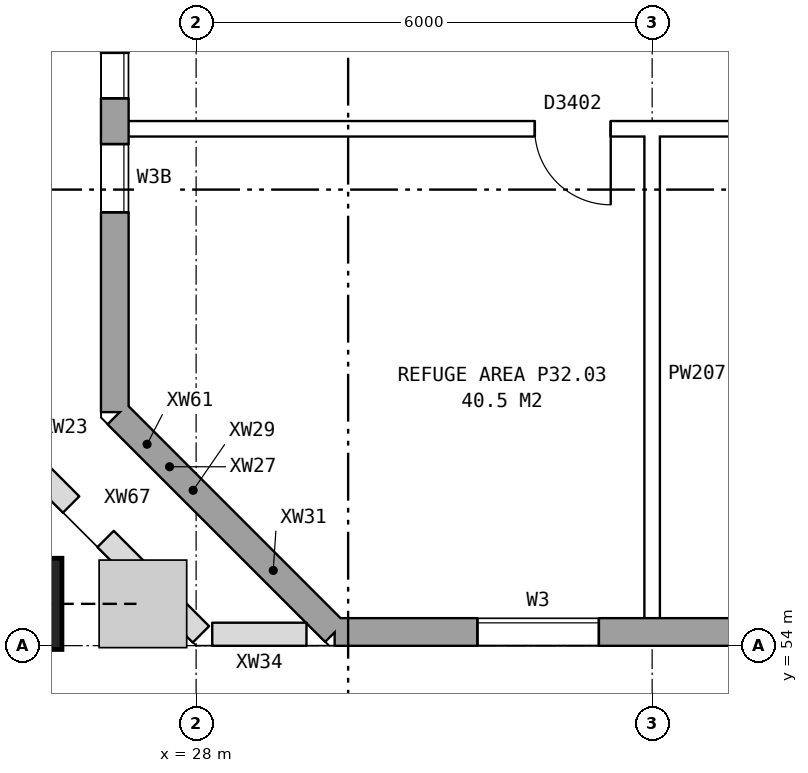
"""IFC4 building model, lengths in metres.
Left out: names, types, materials, properties, quantities, classifications, styles, units other than length and angle.
Written with IfcOpenShell. Run it as: python <this file> out.ifc"""

import sys

from ifc_helpers import new_model, si_unit, direction, frame, frame_2d, origin, origin_2d, place, context, subcontext, project, spatial, rectangle, hollow_rectangle, extrude, element, fill, save


model = new_model("IFC4")
c1 = context("Model", 3, precision=1e-05, world=origin(), true_north=direction((0.0, 1.0)))
c2 = subcontext(c1, "Body", "Model", "MODEL_VIEW")
j1 = project(units=[si_unit("LENGTHUNIT", "METRE"), si_unit("PLANEANGLEUNIT", "RADIAN")], contexts=[c1])
p1 = place(None, origin())
s1 = spatial("IfcSite", under=j1, at=p1, CompositionType="ELEMENT")
p2 = place(p1, origin())
s2 = spatial("IfcBuilding", under=s1, at=p2, CompositionType="ELEMENT")
p3 = place(p2, frame((0.0, 0.0, 115.0)))
s3 = spatial("IfcBuildingStorey", under=s2, at=p3, CompositionType="ELEMENT", Elevation=115.0)
p4 = place(p3, frame((25.635, 54.55, 0.218), z_axis=(0.362446261155, 0.0, 0.932004671541), x_axis=(0.0, 1.0, 0.0)))
e1 = element("IfcColumn", 1, at=p4, inside=s3, PredefinedType="COLUMN", context=c2, shape_type="SweptSolid", body=[
    extrude(hollow_rectangle(XDim=1.2, YDim=1.2, WallThickness=0.065, at=origin_2d()), origin(), (0.0, 0.0, 1.0), 4.362),
])
p5 = place(p3, frame((26.965, 57.039, 0.0), z_axis=(0.0, 0.0, 1.0), x_axis=(0.707106781187, -0.707106781187, 0.0)))
e2 = element("IfcWall", 2, at=p5, inside=s3, PredefinedType="STANDARD", context=c2, shape_type="SweptSolid", body=[
    extrude(rectangle(XDim=0.224, YDim=0.36, at=frame_2d((0.112, 0.0))), origin(), (0.0, 0.0, 1.0), 4.2),
])
p6 = place(p3, frame((27.124, 56.881, 0.953), z_axis=(0.0, 0.0, 1.0), x_axis=(0.707106781187, -0.707106781187, 0.0)))
e3 = element("IfcWall", 3, at=p6, inside=s3, PredefinedType="STANDARD", context=c2, shape_type="SweptSolid", body=[
    extrude(rectangle(XDim=0.652, YDim=0.36, at=frame_2d((0.326, 0.0))), origin(), (0.0, 0.0, 1.0), 3.247),
])
p7 = place(p3, frame((27.585, 56.419, 0.0), z_axis=(0.0, 0.0, 1.0), x_axis=(0.707106781187, -0.707106781187, 0.0)))
e4 = element("IfcWall", 4, at=p7, inside=s3, PredefinedType="STANDARD", context=c2, shape_type="SweptSolid", body=[
    extrude(rectangle(XDim=0.186, YDim=0.36, at=frame_2d((0.093, 0.0))), origin(), (0.0, 0.0, 1.0), 4.2),
])
p8 = place(p3, frame((27.717, 56.288, 0.0), z_axis=(0.0, 0.0, 1.0), x_axis=(0.707106781187, -0.707106781187, 0.0)))
e5 = element("IfcWall", 5, at=p8, inside=s3, PredefinedType="STANDARD", context=c2, shape_type="SweptSolid", body=[
    extrude(rectangle(XDim=0.69, YDim=0.36, at=frame_2d((0.345, 0.0))), origin(), (0.0, 0.0, 1.0), 3.397),
])
p9 = place(p3, frame((28.205, 55.8, 0.0), z_axis=(0.0, 0.0, 1.0), x_axis=(0.707106781187, -0.707106781187, 0.0)))
e6 = element("IfcWall", 6, at=p9, inside=s3, PredefinedType="STANDARD", context=c2, shape_type="SweptSolid", body=[
    extrude(rectangle(XDim=2.291, YDim=0.36, at=frame_2d((1.146, 0.0))), origin(), (0.0, 0.0, 1.0), 4.2),
])
p10 = place(p3, frame((29.825, 54.18, 0.0), z_axis=(0.0, 0.0, 1.0), x_axis=(1.0, 0.0, 0.0)))
e7 = element("IfcWall", 7, at=p10, inside=s3, PredefinedType="STANDARD", context=c2, shape_type="SweptSolid", body=[
    extrude(rectangle(XDim=43.101, YDim=0.36, at=frame_2d((21.55, 0.0))), origin(), (0.0, 0.0, 1.0), 4.2),
])
p11 = place(p10, frame((1.875, 0.0, 1.5)))
e8 = element("IfcOpeningElement", 8, at=p11, cuts=e7, PredefinedType="OPENING", context=c2, shape_type="SweptSolid", body=[
    extrude(rectangle(XDim=1.6, YDim=1.2, at=frame_2d((0.8, 0.6))), frame((0.0, 0.19, 0.0), z_axis=(0.0, -1.0, 0.0), x_axis=(1.0, 0.0, 0.0)), (0.0, 0.0, 1.0), 0.38),
])
p12 = place(p10, frame((5.825, 0.0, 1.5)))
e9 = element("IfcOpeningElement", 9, at=p12, cuts=e7, PredefinedType="OPENING", context=c2, shape_type="SweptSolid", body=[
    extrude(rectangle(XDim=1.6, YDim=1.2, at=frame_2d((0.8, 0.6))), frame((0.0, 0.19, 0.0), z_axis=(0.0, -1.0, 0.0), x_axis=(1.0, 0.0, 0.0)), (0.0, 0.0, 1.0), 0.38),
])
p13 = place(p10, frame((7.875, 0.0, 1.5)))
e10 = element("IfcOpeningElement", 10, at=p13, cuts=e7, PredefinedType="OPENING", context=c2, shape_type="SweptSolid", body=[
    extrude(rectangle(XDim=1.6, YDim=1.2, at=frame_2d((0.8, 0.6))), frame((0.0, 0.19, 0.0), z_axis=(0.0, -1.0, 0.0), x_axis=(1.0, 0.0, 0.0)), (0.0, 0.0, 1.0), 0.38),
])
p14 = place(p10, frame((13.875, 0.0, 1.5)))
e11 = element("IfcOpeningElement", 11, at=p14, cuts=e7, PredefinedType="OPENING", context=c2, shape_type="SweptSolid", body=[
    extrude(rectangle(XDim=1.6, YDim=1.2, at=frame_2d((0.8, 0.6))), frame((0.0, 0.19, 0.0), z_axis=(0.0, -1.0, 0.0), x_axis=(1.0, 0.0, 0.0)), (0.0, 0.0, 1.0), 0.38),
])
p15 = place(p10, frame((18.325, 0.0, 1.5)))
e12 = element("IfcOpeningElement", 12, at=p15, cuts=e7, PredefinedType="OPENING", context=c2, shape_type="SweptSolid", body=[
    extrude(rectangle(XDim=1.2, YDim=1.2, at=frame_2d((0.6, 0.6))), frame((0.0, 0.19, 0.0), z_axis=(0.0, -1.0, 0.0), x_axis=(1.0, 0.0, 0.0)), (0.0, 0.0, 1.0), 0.38),
])
p16 = place(p10, frame((19.875, 0.0, 1.5)))
e13 = element("IfcOpeningElement", 13, at=p16, cuts=e7, PredefinedType="OPENING", context=c2, shape_type="SweptSolid", body=[
    extrude(rectangle(XDim=1.6, YDim=1.2, at=frame_2d((0.8, 0.6))), frame((0.0, 0.19, 0.0), z_axis=(0.0, -1.0, 0.0), x_axis=(1.0, 0.0, 0.0)), (0.0, 0.0, 1.0), 0.38),
])
p17 = place(p10, frame((22.375, 0.0, 1.5)))
e14 = element("IfcOpeningElement", 14, at=p17, cuts=e7, PredefinedType="OPENING", context=c2, shape_type="SweptSolid", body=[
    extrude(rectangle(XDim=0.6, YDim=1.2, at=frame_2d((0.3, 0.6))), frame((0.0, 0.19, 0.0), z_axis=(0.0, -1.0, 0.0), x_axis=(1.0, 0.0, 0.0)), (0.0, 0.0, 1.0), 0.38),
])
p18 = place(p10, frame((25.875, 0.0, 1.5)))
e15 = element("IfcOpeningElement", 15, at=p18, cuts=e7, PredefinedType="OPENING", context=c2, shape_type="SweptSolid", body=[
    extrude(rectangle(XDim=1.6, YDim=1.2, at=frame_2d((0.8, 0.6))), frame((0.0, 0.19, 0.0), z_axis=(0.0, -1.0, 0.0), x_axis=(1.0, 0.0, 0.0)), (0.0, 0.0, 1.0), 0.38),
])
p19 = place(p10, frame((30.775, 0.0, 1.5)))
e16 = element("IfcOpeningElement", 16, at=p19, cuts=e7, PredefinedType="OPENING", context=c2, shape_type="SweptSolid", body=[
    extrude(rectangle(XDim=0.6, YDim=1.2, at=frame_2d((0.3, 0.6))), frame((0.0, 0.19, 0.0), z_axis=(0.0, -1.0, 0.0), x_axis=(1.0, 0.0, 0.0)), (0.0, 0.0, 1.0), 0.38),
])
p20 = place(p10, frame((31.875, 0.0, 1.5)))
e17 = element("IfcOpeningElement", 17, at=p20, cuts=e7, PredefinedType="OPENING", context=c2, shape_type="SweptSolid", body=[
    extrude(rectangle(XDim=1.6, YDim=1.2, at=frame_2d((0.8, 0.6))), frame((0.0, 0.19, 0.0), z_axis=(0.0, -1.0, 0.0), x_axis=(1.0, 0.0, 0.0)), (0.0, 0.0, 1.0), 0.38),
])
p21 = place(p10, frame((34.375, 0.0, 1.5)))
e18 = element("IfcOpeningElement", 18, at=p21, cuts=e7, PredefinedType="OPENING", context=c2, shape_type="SweptSolid", body=[
    extrude(rectangle(XDim=0.9, YDim=1.2, at=frame_2d((0.45, 0.6))), frame((0.0, 0.19, 0.0), z_axis=(0.0, -1.0, 0.0), x_axis=(1.0, 0.0, 0.0)), (0.0, 0.0, 1.0), 0.38),
])
p22 = place(p10, frame((37.875, 0.0, 1.5)))
e19 = element("IfcOpeningElement", 19, at=p22, cuts=e7, PredefinedType="OPENING", context=c2, shape_type="SweptSolid", body=[
    extrude(rectangle(XDim=1.6, YDim=1.2, at=frame_2d((0.8, 0.6))), frame((0.0, 0.19, 0.0), z_axis=(0.0, -1.0, 0.0), x_axis=(1.0, 0.0, 0.0)), (0.0, 0.0, 1.0), 0.38),
])
p23 = place(p10, frame((39.775, 0.0, 1.5)))
e20 = element("IfcOpeningElement", 20, at=p23, cuts=e7, PredefinedType="OPENING", context=c2, shape_type="SweptSolid", body=[
    extrude(rectangle(XDim=0.6, YDim=1.2, at=frame_2d((0.3, 0.6))), frame((0.0, 0.19, 0.0), z_axis=(0.0, -1.0, 0.0), x_axis=(1.0, 0.0, 0.0)), (0.0, 0.0, 1.0), 0.38),
])
p24 = place(p3, frame((26.93, 82.925, 0.0), z_axis=(0.0, 0.0, 1.0), x_axis=(0.0, -1.0, 0.0)))
e21 = element("IfcWall", 21, at=p24, inside=s3, PredefinedType="STANDARD", context=c2, shape_type="SweptSolid", body=[
    extrude(rectangle(XDim=25.851, YDim=0.36, at=frame_2d((12.925, 0.0))), origin(), (0.0, 0.0, 1.0), 4.2),
])
p25 = place(p24, frame((1.625, 0.0, 1.5)))
e22 = element("IfcOpeningElement", 22, at=p25, cuts=e21, PredefinedType="OPENING", context=c2, shape_type="SweptSolid", body=[
    extrude(rectangle(XDim=1.6, YDim=1.2, at=frame_2d((0.8, 0.6))), frame((0.0, 0.19, 0.0), z_axis=(0.0, -1.0, 0.0), x_axis=(1.0, 0.0, 0.0)), (0.0, 0.0, 1.0), 0.38),
])
p26 = place(p24, frame((4.625, 0.0, 1.5)))
e23 = element("IfcOpeningElement", 23, at=p26, cuts=e21, PredefinedType="OPENING", context=c2, shape_type="SweptSolid", body=[
    extrude(rectangle(XDim=1.6, YDim=1.2, at=frame_2d((0.8, 0.6))), frame((0.0, 0.19, 0.0), z_axis=(0.0, -1.0, 0.0), x_axis=(1.0, 0.0, 0.0)), (0.0, 0.0, 1.0), 0.38),
])
p27 = place(p24, frame((8.775, 0.0, 1.5)))
e24 = element("IfcOpeningElement", 24, at=p27, cuts=e21, PredefinedType="OPENING", context=c2, shape_type="SweptSolid", body=[
    extrude(rectangle(XDim=0.6, YDim=1.2, at=frame_2d((0.3, 0.6))), frame((0.0, 0.19, 0.0), z_axis=(0.0, -1.0, 0.0), x_axis=(1.0, 0.0, 0.0)), (0.0, 0.0, 1.0), 0.38),
])
p28 = place(p24, frame((9.675, 0.0, 1.5)))
e25 = element("IfcOpeningElement", 25, at=p28, cuts=e21, PredefinedType="OPENING", context=c2, shape_type="SweptSolid", body=[
    extrude(rectangle(XDim=1.2, YDim=1.2, at=frame_2d((0.6, 0.6))), frame((0.0, 0.19, 0.0), z_axis=(0.0, -1.0, 0.0), x_axis=(1.0, 0.0, 0.0)), (0.0, 0.0, 1.0), 0.38),
])
p29 = place(p24, frame((13.625, 0.0, 1.5)))
e26 = element("IfcOpeningElement", 26, at=p29, cuts=e21, PredefinedType="OPENING", context=c2, shape_type="SweptSolid", body=[
    extrude(rectangle(XDim=1.6, YDim=1.2, at=frame_2d((0.8, 0.6))), frame((0.0, 0.19, 0.0), z_axis=(0.0, -1.0, 0.0), x_axis=(1.0, 0.0, 0.0)), (0.0, 0.0, 1.0), 0.38),
])
p30 = place(p24, frame((16.625, 0.0, 1.5)))
e27 = element("IfcOpeningElement", 27, at=p30, cuts=e21, PredefinedType="OPENING", context=c2, shape_type="SweptSolid", body=[
    extrude(rectangle(XDim=1.6, YDim=1.2, at=frame_2d((0.8, 0.6))), frame((0.0, 0.19, 0.0), z_axis=(0.0, -1.0, 0.0), x_axis=(1.0, 0.0, 0.0)), (0.0, 0.0, 1.0), 0.38),
])
p31 = place(p24, frame((21.125, 0.0, 1.5)))
e28 = element("IfcOpeningElement", 28, at=p31, cuts=e21, PredefinedType="OPENING", context=c2, shape_type="SweptSolid", body=[
    extrude(rectangle(XDim=0.6, YDim=1.2, at=frame_2d((0.3, 0.6))), frame((0.0, 0.19, 0.0), z_axis=(0.0, -1.0, 0.0), x_axis=(1.0, 0.0, 0.0)), (0.0, 0.0, 1.0), 0.38),
])
p32 = place(p24, frame((22.325, 0.0, 1.5)))
e29 = element("IfcOpeningElement", 29, at=p32, cuts=e21, PredefinedType="OPENING", context=c2, shape_type="SweptSolid", body=[
    extrude(rectangle(XDim=0.9, YDim=1.2, at=frame_2d((0.45, 0.6))), frame((0.0, 0.19, 0.0), z_axis=(0.0, -1.0, 0.0), x_axis=(1.0, 0.0, 0.0)), (0.0, 0.0, 1.0), 0.38),
])
p33 = place(p24, frame((15.525, 0.0, 1.5)))
e30 = element("IfcOpeningElement", 30, at=p33, cuts=e21, PredefinedType="OPENING", context=c2, shape_type="SweptSolid", body=[
    extrude(rectangle(XDim=0.6, YDim=1.2, at=frame_2d((0.3, 0.6))), frame((0.0, 0.19, 0.0), z_axis=(0.0, -1.0, 0.0), x_axis=(1.0, 0.0, 0.0)), (0.0, 0.0, 1.0), 0.38),
])
p34 = place(p3, frame((25.398, 56.814, 0.0), z_axis=(0.0, 0.0, 1.0), x_axis=(0.707106781187, -0.707106781187, 0.0)))
e31 = element("IfcWall", 31, at=p34, inside=s3, PredefinedType="PARAPET", context=c2, shape_type="SweptSolid", body=[
    extrude(rectangle(XDim=1.352, YDim=0.3, at=frame_2d((0.676, 0.0))), origin(), (0.0, 0.0, 1.0), 1.1),
])
p35 = place(p3, frame((26.81, 55.402, 0.0), z_axis=(0.0, 0.0, 1.0), x_axis=(0.707037825433, -0.707175730216, 0.0)))
e32 = element("IfcWall", 32, at=p35, inside=s3, PredefinedType="PARAPET", context=c2, shape_type="SweptSolid", body=[
    extrude(rectangle(XDim=1.77, YDim=0.3, at=frame_2d((0.885, 0.0))), origin(), (0.0, 0.0, 1.0), 1.1),
])
p36 = place(p3, frame((28.214, 54.15, 0.0), z_axis=(0.0, 0.0, 1.0), x_axis=(1.0, 0.0, 0.0)))
e33 = element("IfcWall", 33, at=p36, inside=s3, PredefinedType="PARAPET", context=c2, shape_type="SweptSolid", body=[
    extrude(rectangle(XDim=1.236, YDim=0.3, at=frame_2d((0.618, 0.0))), origin(), (0.0, 0.0, 1.0), 1.1),
])
p37 = place(p3, frame((26.99, 60.8, 0.0), z_axis=(0.0, 0.0, 1.0), x_axis=(1.0, 0.0, 0.0)))
e34 = element("IfcWall", 34, at=p37, inside=s3, PredefinedType="PARTITIONING", context=c2, shape_type="SweptSolid", body=[
    extrude(rectangle(XDim=48.77, YDim=0.2, at=frame_2d((24.385, 0.0))), origin(), (0.0, 0.0, 1.0), 4.2),
])
p38 = place(p37, frame((5.465, 0.0, 0.0)))
e35 = element("IfcOpeningElement", 35, at=p38, cuts=e34, PredefinedType="OPENING", context=c2, shape_type="SweptSolid", body=[
    extrude(rectangle(XDim=1.0, YDim=2.1, at=frame_2d((0.5, 1.05))), frame((0.0, 0.11, 0.0), z_axis=(0.0, -1.0, 0.0), x_axis=(1.0, 0.0, 0.0)), (0.0, 0.0, 1.0), 0.22),
])
p39 = place(p37, frame((9.51, 0.0, 0.0)))
e36 = element("IfcOpeningElement", 36, at=p39, cuts=e34, PredefinedType="OPENING", context=c2, shape_type="SweptSolid", body=[
    extrude(rectangle(XDim=1.0, YDim=2.1, at=frame_2d((0.5, 1.05))), frame((0.0, 0.11, 0.0), z_axis=(0.0, -1.0, 0.0), x_axis=(1.0, 0.0, 0.0)), (0.0, 0.0, 1.0), 0.22),
])
p40 = place(p37, frame((15.51, 0.0, 0.0)))
e37 = element("IfcOpeningElement", 37, at=p40, cuts=e34, PredefinedType="OPENING", context=c2, shape_type="SweptSolid", body=[
    extrude(rectangle(XDim=1.0, YDim=2.1, at=frame_2d((0.5, 1.05))), frame((0.0, 0.11, 0.0), z_axis=(0.0, -1.0, 0.0), x_axis=(1.0, 0.0, 0.0)), (0.0, 0.0, 1.0), 0.22),
])
p41 = place(p37, frame((21.51, 0.0, 0.0)))
e38 = element("IfcOpeningElement", 38, at=p41, cuts=e34, PredefinedType="OPENING", context=c2, shape_type="SweptSolid", body=[
    extrude(rectangle(XDim=1.0, YDim=2.1, at=frame_2d((0.5, 1.05))), frame((0.0, 0.11, 0.0), z_axis=(0.0, -1.0, 0.0), x_axis=(1.0, 0.0, 0.0)), (0.0, 0.0, 1.0), 0.22),
])
p42 = place(p37, frame((30.51, 0.0, 0.0)))
e39 = element("IfcOpeningElement", 39, at=p42, cuts=e34, PredefinedType="OPENING", context=c2, shape_type="SweptSolid", body=[
    extrude(rectangle(XDim=1.0, YDim=2.1, at=frame_2d((0.5, 1.05))), frame((0.0, 0.11, 0.0), z_axis=(0.0, -1.0, 0.0), x_axis=(1.0, 0.0, 0.0)), (0.0, 0.0, 1.0), 0.22),
])
p43 = place(p37, frame((42.33, 0.0, 0.0)))
e40 = element("IfcOpeningElement", 40, at=p43, cuts=e34, PredefinedType="OPENING", context=c2, shape_type="SweptSolid", body=[
    extrude(rectangle(XDim=1.0, YDim=2.1, at=frame_2d((0.5, 1.05))), frame((0.0, 0.11, 0.0), z_axis=(0.0, -1.0, 0.0), x_axis=(1.0, 0.0, 0.0)), (0.0, 0.0, 1.0), 0.22),
])
p44 = place(p3, frame((34.0, 54.24, 0.0), z_axis=(0.0, 0.0, 1.0), x_axis=(0.0, 1.0, 0.0)))
e41 = element("IfcWall", 41, at=p44, inside=s3, PredefinedType="PARTITIONING", context=c2, shape_type="SweptSolid", body=[
    extrude(rectangle(XDim=6.66, YDim=0.2, at=frame_2d((3.33, 0.0))), origin(), (0.0, 0.0, 1.0), 4.2),
])
p45 = place(p11, origin())
e42 = element("IfcWindow", 42, at=p45, inside=s3, PartitioningType="DOUBLE_PANEL_HORIZONTAL", PredefinedType="WINDOW", context=c2, shape_type="SweptSolid", body=[
    extrude(rectangle(XDim=1.6, YDim=1.2, at=frame_2d((0.8, 0.6))), frame((0.0, 0.15, 0.0), z_axis=(0.0, -1.0, 0.0), x_axis=(1.0, 0.0, 0.0)), (0.0, 0.0, 1.0), 0.06),
])
fill(e8, e42)
p46 = place(p31, origin())
e43 = element("IfcWindow", 43, at=p46, inside=s3, PartitioningType="DOUBLE_PANEL_HORIZONTAL", PredefinedType="WINDOW", context=c2, shape_type="SweptSolid", body=[
    extrude(rectangle(XDim=0.6, YDim=1.2, at=frame_2d((0.3, 0.6))), frame((0.0, 0.15, 0.0), z_axis=(0.0, -1.0, 0.0), x_axis=(1.0, 0.0, 0.0)), (0.0, 0.0, 1.0), 0.06),
])
fill(e28, e43)
p47 = place(p32, origin())
e44 = element("IfcWindow", 44, at=p47, inside=s3, PartitioningType="DOUBLE_PANEL_HORIZONTAL", PredefinedType="WINDOW", context=c2, shape_type="SweptSolid", body=[
    extrude(rectangle(XDim=0.9, YDim=1.2, at=frame_2d((0.45, 0.6))), frame((0.0, 0.15, 0.0), z_axis=(0.0, -1.0, 0.0), x_axis=(1.0, 0.0, 0.0)), (0.0, 0.0, 1.0), 0.06),
])
fill(e29, e44)
p48 = place(p38, frame((1.0, 0.0, 0.0), z_axis=(0.0, 0.0, 1.0), x_axis=(-1.0, 0.0, 0.0)))
e45 = element("IfcDoor", 45, at=p48, inside=s3, OperationType="SINGLE_SWING_LEFT", PredefinedType="DOOR", context=c2, shape_type="SweptSolid", body=[
    extrude(rectangle(XDim=1.0, YDim=2.1, at=frame_2d((0.5, 1.05))), frame((0.0, 0.025, 0.0), z_axis=(0.0, -1.0, 0.0), x_axis=(1.0, 0.0, 0.0)), (0.0, 0.0, 1.0), 0.05),
])
fill(e35, e45)
save(model, sys.argv[1])
